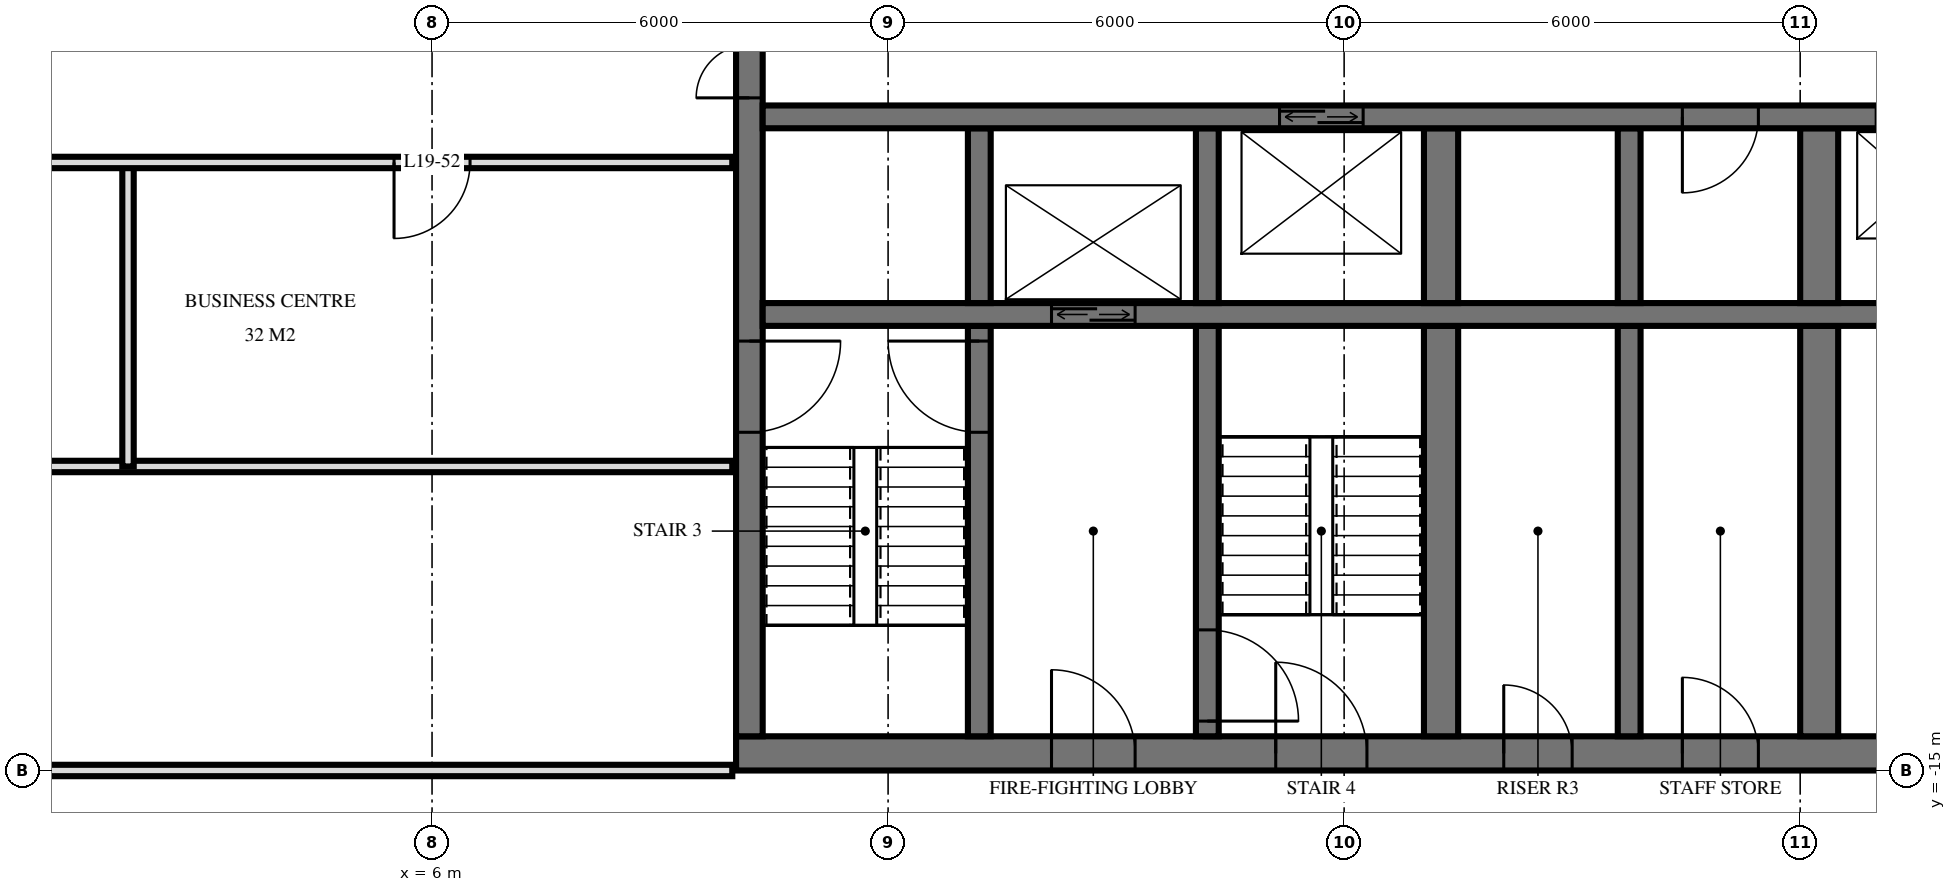
"""IFC4 building model, lengths in metres.
Left out: names, types, materials, properties, quantities, classifications, styles, units other than length and angle.
Written with IfcOpenShell. Run it as: python <this file> out.ifc"""

import sys

from ifc_helpers import new_model, si_unit, direction, frame, frame_2d, origin, place, context, subcontext, project, spatial, rectangle, extrude, element, fill, save


model = new_model("IFC4")
c1 = context("Model", 3, precision=1e-05, world=origin(), true_north=direction((0.0, 1.0)))
c2 = subcontext(c1, "Body", "Model", "MODEL_VIEW")
j1 = project(units=[si_unit("LENGTHUNIT", "METRE"), si_unit("PLANEANGLEUNIT", "RADIAN")], contexts=[c1])
p1 = place(None, origin())
s1 = spatial("IfcSite", under=j1, at=p1, CompositionType="ELEMENT")
p2 = place(p1, origin())
s2 = spatial("IfcBuilding", under=s1, at=p2, CompositionType="ELEMENT")
p3 = place(p2, frame((0.0, 0.0, 78.0)))
s3 = spatial("IfcBuildingStorey", under=s2, at=p3, CompositionType="ELEMENT", Elevation=78.0)
p4 = place(p3, frame((10.0, -14.775, 0.0), z_axis=(0.0, 0.0, 1.0), x_axis=(1.0, 0.0, 0.0)))
e1 = element("IfcWall", 1, at=p4, inside=s3, PredefinedType="SHEAR", context=c2, shape_type="SweptSolid", body=[
    extrude(rectangle(XDim=19.5, YDim=0.45, at=frame_2d((9.75, 0.0))), origin(), (0.0, 0.0, 1.0), 3.6),
])
p5 = place(p4, frame((7.1, 0.0, 0.0)))
e2 = element("IfcOpeningElement", 2, at=p5, cuts=e1, PredefinedType="OPENING", context=c2, shape_type="SweptSolid", body=[
    extrude(rectangle(XDim=1.2, YDim=2.1, at=frame_2d((0.6, 1.05))), frame((0.0, 0.235, 0.0), z_axis=(0.0, -1.0, 0.0), x_axis=(1.0, 0.0, 0.0)), (0.0, 0.0, 1.0), 0.47),
])
p6 = place(p4, frame((4.15, 0.0, 0.0)))
e3 = element("IfcOpeningElement", 3, at=p6, cuts=e1, PredefinedType="OPENING", context=c2, shape_type="SweptSolid", body=[
    extrude(rectangle(XDim=1.1, YDim=2.1, at=frame_2d((0.55, 1.05))), frame((0.0, 0.235, 0.0), z_axis=(0.0, -1.0, 0.0), x_axis=(1.0, 0.0, 0.0)), (0.0, 0.0, 1.0), 0.47),
])
p7 = place(p4, frame((10.1, 0.0, 0.0)))
e4 = element("IfcOpeningElement", 4, at=p7, cuts=e1, PredefinedType="OPENING", context=c2, shape_type="SweptSolid", body=[
    extrude(rectangle(XDim=0.9, YDim=2.1, at=frame_2d((0.45, 1.05))), frame((0.0, 0.235, 0.0), z_axis=(0.0, -1.0, 0.0), x_axis=(1.0, 0.0, 0.0)), (0.0, 0.0, 1.0), 0.47),
])
p8 = place(p4, frame((12.45, 0.0, 0.0)))
e5 = element("IfcOpeningElement", 5, at=p8, cuts=e1, PredefinedType="OPENING", context=c2, shape_type="SweptSolid", body=[
    extrude(rectangle(XDim=1.0, YDim=2.1, at=frame_2d((0.5, 1.05))), frame((0.0, 0.235, 0.0), z_axis=(0.0, -1.0, 0.0), x_axis=(1.0, 0.0, 0.0)), (0.0, 0.0, 1.0), 0.47),
])
p9 = place(p4, frame((15.512, 0.0, 0.0)))
e6 = element("IfcOpeningElement", 6, at=p9, cuts=e1, PredefinedType="OPENING", context=c2, shape_type="SweptSolid", body=[
    extrude(rectangle(XDim=1.0, YDim=2.1, at=frame_2d((0.5, 1.05))), frame((0.0, 0.235, 0.0), z_axis=(0.0, -1.0, 0.0), x_axis=(1.0, 0.0, 0.0)), (0.0, 0.0, 1.0), 0.47),
])
p10 = place(p4, frame((17.837, 0.0, 0.0)))
e7 = element("IfcOpeningElement", 7, at=p10, cuts=e1, PredefinedType="OPENING", context=c2, shape_type="SweptSolid", body=[
    extrude(rectangle(XDim=1.0, YDim=2.1, at=frame_2d((0.5, 1.05))), frame((0.0, 0.235, 0.0), z_axis=(0.0, -1.0, 0.0), x_axis=(1.0, 0.0, 0.0)), (0.0, 0.0, 1.0), 0.47),
])
p11 = place(p3, frame((10.175, -14.55, 0.0), z_axis=(0.0, 0.0, 1.0), x_axis=(0.0, 1.0, 0.0)))
e8 = element("IfcWall", 8, at=p11, inside=s3, PredefinedType="SHEAR", context=c2, shape_type="SweptSolid", body=[
    extrude(rectangle(XDim=14.1, YDim=0.35, at=frame_2d((7.05, 0.0))), origin(), (0.0, 0.0, 1.0), 3.6),
])
p12 = place(p11, frame((8.4, 0.0, 0.0)))
e9 = element("IfcOpeningElement", 9, at=p12, cuts=e8, PredefinedType="OPENING", context=c2, shape_type="SweptSolid", body=[
    extrude(rectangle(XDim=1.4, YDim=2.4, at=frame_2d((0.7, 1.2))), frame((0.0, 0.185, 0.0), z_axis=(0.0, -1.0, 0.0), x_axis=(1.0, 0.0, 0.0)), (0.0, 0.0, 1.0), 0.37),
])
p13 = place(p11, frame((10.0, 0.0, 0.0)))
e10 = element("IfcOpeningElement", 10, at=p13, cuts=e8, PredefinedType="OPENING", context=c2, shape_type="SweptSolid", body=[
    extrude(rectangle(XDim=1.4, YDim=2.4, at=frame_2d((0.7, 1.2))), frame((0.0, 0.185, 0.0), z_axis=(0.0, -1.0, 0.0), x_axis=(1.0, 0.0, 0.0)), (0.0, 0.0, 1.0), 0.37),
])
p14 = place(p11, frame((4.0, 0.0, 0.0)))
e11 = element("IfcOpeningElement", 11, at=p14, cuts=e8, PredefinedType="OPENING", context=c2, shape_type="SweptSolid", body=[
    extrude(rectangle(XDim=1.2, YDim=2.1, at=frame_2d((0.6, 1.05))), frame((0.0, 0.185, 0.0), z_axis=(0.0, -1.0, 0.0), x_axis=(1.0, 0.0, 0.0)), (0.0, 0.0, 1.0), 0.37),
])
p15 = place(p3, frame((10.35, -6.4, 0.0), z_axis=(0.0, 0.0, 1.0), x_axis=(1.0, 0.0, 0.0)))
e12 = element("IfcWall", 12, at=p15, inside=s3, PredefinedType="SHEAR", context=c2, shape_type="SweptSolid", body=[
    extrude(rectangle(XDim=18.7, YDim=0.3, at=frame_2d((9.35, 0.0))), origin(), (0.0, 0.0, 1.0), 3.6),
])
p16 = place(p15, frame((14.65, 0.0, 0.0)))
e13 = element("IfcOpeningElement", 13, at=p16, cuts=e12, PredefinedType="OPENING", context=c2, shape_type="SweptSolid", body=[
    extrude(rectangle(XDim=1.1, YDim=2.1, at=frame_2d((0.55, 1.05))), frame((0.0, 0.16, 0.0), z_axis=(0.0, -1.0, 0.0), x_axis=(1.0, 0.0, 0.0)), (0.0, 0.0, 1.0), 0.32),
])
p17 = place(p15, frame((17.05, 0.0, 0.0)))
e14 = element("IfcOpeningElement", 14, at=p17, cuts=e12, PredefinedType="OPENING", context=c2, shape_type="SweptSolid", body=[
    extrude(rectangle(XDim=1.1, YDim=2.1, at=frame_2d((0.55, 1.05))), frame((0.0, 0.16, 0.0), z_axis=(0.0, -1.0, 0.0), x_axis=(1.0, 0.0, 0.0)), (0.0, 0.0, 1.0), 0.32),
])
p18 = place(p15, frame((6.8, 0.0, 0.0)))
e15 = element("IfcOpeningElement", 15, at=p18, cuts=e12, PredefinedType="OPENING", context=c2, shape_type="SweptSolid", body=[
    extrude(rectangle(XDim=1.1, YDim=2.1, at=frame_2d((0.55, 1.05))), frame((0.0, 0.16, 0.0), z_axis=(0.0, -1.0, 0.0), x_axis=(1.0, 0.0, 0.0)), (0.0, 0.0, 1.0), 0.32),
])
p19 = place(p15, frame((12.1, 0.0, 0.0)))
e16 = element("IfcOpeningElement", 16, at=p19, cuts=e12, PredefinedType="OPENING", context=c2, shape_type="SweptSolid", body=[
    extrude(rectangle(XDim=1.0, YDim=2.1, at=frame_2d((0.5, 1.05))), frame((0.0, 0.16, 0.0), z_axis=(0.0, -1.0, 0.0), x_axis=(1.0, 0.0, 0.0)), (0.0, 0.0, 1.0), 0.32),
])
p20 = place(p3, frame((10.35, -9.0, 0.0), z_axis=(0.0, 0.0, 1.0), x_axis=(1.0, 0.0, 0.0)))
e17 = element("IfcWall", 17, at=p20, inside=s3, PredefinedType="SHEAR", context=c2, shape_type="SweptSolid", body=[
    extrude(rectangle(XDim=18.7, YDim=0.3, at=frame_2d((9.35, 0.0))), origin(), (0.0, 0.0, 1.0), 3.6),
])
p21 = place(p20, frame((3.8, 0.0, 0.0)))
e18 = element("IfcOpeningElement", 18, at=p21, cuts=e17, PredefinedType="OPENING", context=c2, shape_type="SweptSolid", body=[
    extrude(rectangle(XDim=1.1, YDim=2.1, at=frame_2d((0.55, 1.05))), frame((0.0, 0.16, 0.0), z_axis=(0.0, -1.0, 0.0), x_axis=(1.0, 0.0, 0.0)), (0.0, 0.0, 1.0), 0.32),
])
p22 = place(p3, frame((13.2, -8.85, 0.0), z_axis=(0.0, 0.0, 1.0), x_axis=(0.0, 1.0, 0.0)))
e19 = element("IfcWall", 19, at=p22, inside=s3, PredefinedType="SHEAR", context=c2, shape_type="SweptSolid", body=[
    extrude(rectangle(XDim=2.3, YDim=0.3, at=frame_2d((1.15, 0.0))), origin(), (0.0, 0.0, 1.0), 3.6),
])
p23 = place(p3, frame((13.2, -14.55, 0.0), z_axis=(0.0, 0.0, 1.0), x_axis=(0.0, 1.0, 0.0)))
e20 = element("IfcWall", 20, at=p23, inside=s3, PredefinedType="SHEAR", context=c2, shape_type="SweptSolid", body=[
    extrude(rectangle(XDim=5.4, YDim=0.3, at=frame_2d((2.7, 0.0))), origin(), (0.0, 0.0, 1.0), 3.6),
])
p24 = place(p23, frame((4.0, 0.0, 0.0)))
e21 = element("IfcOpeningElement", 21, at=p24, cuts=e20, PredefinedType="OPENING", context=c2, shape_type="SweptSolid", body=[
    extrude(rectangle(XDim=1.2, YDim=2.1, at=frame_2d((0.6, 1.05))), frame((0.0, 0.16, 0.0), z_axis=(0.0, -1.0, 0.0), x_axis=(1.0, 0.0, 0.0)), (0.0, 0.0, 1.0), 0.32),
])
p25 = place(p3, frame((16.2, -8.85, 0.0), z_axis=(0.0, 0.0, 1.0), x_axis=(0.0, 1.0, 0.0)))
e22 = element("IfcWall", 22, at=p25, inside=s3, PredefinedType="SHEAR", context=c2, shape_type="SweptSolid", body=[
    extrude(rectangle(XDim=2.3, YDim=0.3, at=frame_2d((1.15, 0.0))), origin(), (0.0, 0.0, 1.0), 3.6),
])
p26 = place(p3, frame((16.2, -14.55, 0.0), z_axis=(0.0, 0.0, 1.0), x_axis=(0.0, 1.0, 0.0)))
e23 = element("IfcWall", 23, at=p26, inside=s3, PredefinedType="SHEAR", context=c2, shape_type="SweptSolid", body=[
    extrude(rectangle(XDim=5.4, YDim=0.3, at=frame_2d((2.7, 0.0))), origin(), (0.0, 0.0, 1.0), 3.6),
])
p27 = place(p26, frame((0.2, 0.0, 0.0)))
e24 = element("IfcOpeningElement", 24, at=p27, cuts=e23, PredefinedType="OPENING", context=c2, shape_type="SweptSolid", body=[
    extrude(rectangle(XDim=1.2, YDim=2.1, at=frame_2d((0.6, 1.05))), frame((0.0, 0.16, 0.0), z_axis=(0.0, -1.0, 0.0), x_axis=(1.0, 0.0, 0.0)), (0.0, 0.0, 1.0), 0.32),
])
p28 = place(p3, frame((19.275, -8.85, 0.0), z_axis=(0.0, 0.0, 1.0), x_axis=(0.0, 1.0, 0.0)))
e25 = element("IfcWall", 25, at=p28, inside=s3, PredefinedType="SHEAR", context=c2, shape_type="SweptSolid", body=[
    extrude(rectangle(XDim=2.3, YDim=0.45, at=frame_2d((1.15, 0.0))), origin(), (0.0, 0.0, 1.0), 3.6),
])
p29 = place(p3, frame((19.275, -14.55, 0.0), z_axis=(0.0, 0.0, 1.0), x_axis=(0.0, 1.0, 0.0)))
e26 = element("IfcWall", 26, at=p29, inside=s3, PredefinedType="SHEAR", context=c2, shape_type="SweptSolid", body=[
    extrude(rectangle(XDim=5.4, YDim=0.45, at=frame_2d((2.7, 0.0))), origin(), (0.0, 0.0, 1.0), 3.6),
])
p30 = place(p3, frame((21.75, -8.85, 0.0), z_axis=(0.0, 0.0, 1.0), x_axis=(0.0, 1.0, 0.0)))
e27 = element("IfcWall", 27, at=p30, inside=s3, PredefinedType="SHEAR", context=c2, shape_type="SweptSolid", body=[
    extrude(rectangle(XDim=2.3, YDim=0.3, at=frame_2d((1.15, 0.0))), origin(), (0.0, 0.0, 1.0), 3.6),
])
p31 = place(p3, frame((21.75, -14.55, 0.0), z_axis=(0.0, 0.0, 1.0), x_axis=(0.0, 1.0, 0.0)))
e28 = element("IfcWall", 28, at=p31, inside=s3, PredefinedType="SHEAR", context=c2, shape_type="SweptSolid", body=[
    extrude(rectangle(XDim=5.4, YDim=0.3, at=frame_2d((2.7, 0.0))), origin(), (0.0, 0.0, 1.0), 3.6),
])
p32 = place(p3, frame((24.25, -8.85, 0.0), z_axis=(0.0, 0.0, 1.0), x_axis=(0.0, 1.0, 0.0)))
e29 = element("IfcWall", 29, at=p32, inside=s3, PredefinedType="SHEAR", context=c2, shape_type="SweptSolid", body=[
    extrude(rectangle(XDim=2.3, YDim=0.5, at=frame_2d((1.15, 0.0))), origin(), (0.0, 0.0, 1.0), 3.6),
])
p33 = place(p3, frame((24.25, -14.55, 0.0), z_axis=(0.0, 0.0, 1.0), x_axis=(0.0, 1.0, 0.0)))
e30 = element("IfcWall", 30, at=p33, inside=s3, PredefinedType="SHEAR", context=c2, shape_type="SweptSolid", body=[
    extrude(rectangle(XDim=5.4, YDim=0.5, at=frame_2d((2.7, 0.0))), origin(), (0.0, 0.0, 1.0), 3.6),
])
p34 = place(p3, frame((2.0, -11.0, 0.0), z_axis=(0.0, 0.0, 1.0), x_axis=(0.0, 1.0, 0.0)))
e31 = element("IfcWall", 31, at=p34, inside=s3, PredefinedType="PARTITIONING", context=c2, shape_type="SweptSolid", body=[
    extrude(rectangle(XDim=4.0, YDim=0.15, at=frame_2d((2.0, 0.0))), origin(), (0.0, 0.0, 1.0), 3.32),
])
p35 = place(p3, frame((-9.95, -15.0, 0.0), z_axis=(0.0, 0.0, 1.0), x_axis=(1.0, 0.0, 0.0)))
e32 = element("IfcWall", 32, at=p35, inside=s3, PredefinedType="PARTITIONING", context=c2, shape_type="SweptSolid", body=[
    extrude(rectangle(XDim=19.9, YDim=0.15, at=frame_2d((9.95, 0.0))), origin(), (0.0, 0.0, 1.0), 2.684),
])
p36 = place(p35, frame((9.45, 0.0, 0.0)))
e33 = element("IfcOpeningElement", 33, at=p36, cuts=e32, PredefinedType="OPENING", context=c2, shape_type="SweptSolid", body=[
    extrude(rectangle(XDim=1.0, YDim=2.1, at=frame_2d((0.5, 1.05))), frame((0.0, 0.085, 0.0), z_axis=(0.0, -1.0, 0.0), x_axis=(1.0, 0.0, 0.0)), (0.0, 0.0, 1.0), 0.17),
])
p37 = place(p3, frame((-9.95, -11.0, 0.0), z_axis=(0.0, 0.0, 1.0), x_axis=(1.0, 0.0, 0.0)))
e34 = element("IfcWall", 34, at=p37, inside=s3, PredefinedType="PARTITIONING", context=c2, shape_type="SweptSolid", body=[
    extrude(rectangle(XDim=19.9, YDim=0.15, at=frame_2d((9.95, 0.0))), origin(), (0.0, 0.0, 1.0), 3.32),
])
p38 = place(p37, frame((9.45, 0.0, 0.0)))
e35 = element("IfcOpeningElement", 35, at=p38, cuts=e34, PredefinedType="OPENING", context=c2, shape_type="SweptSolid", body=[
    extrude(rectangle(XDim=1.0, YDim=2.1, at=frame_2d((0.5, 1.05))), frame((0.0, 0.085, 0.0), z_axis=(0.0, -1.0, 0.0), x_axis=(1.0, 0.0, 0.0)), (0.0, 0.0, 1.0), 0.17),
])
p39 = place(p37, frame((3.45, 0.0, 0.0)))
e36 = element("IfcOpeningElement", 36, at=p39, cuts=e34, PredefinedType="OPENING", context=c2, shape_type="SweptSolid", body=[
    extrude(rectangle(XDim=1.0, YDim=2.1, at=frame_2d((0.5, 1.05))), frame((0.0, 0.085, 0.0), z_axis=(0.0, -1.0, 0.0), x_axis=(1.0, 0.0, 0.0)), (0.0, 0.0, 1.0), 0.17),
])
p40 = place(p3, frame((-9.95, -7.0, 0.0), z_axis=(0.0, 0.0, 1.0), x_axis=(1.0, 0.0, 0.0)))
e37 = element("IfcWall", 37, at=p40, inside=s3, PredefinedType="PARTITIONING", context=c2, shape_type="SweptSolid", body=[
    extrude(rectangle(XDim=19.9, YDim=0.15, at=frame_2d((9.95, 0.0))), origin(), (0.0, 0.0, 1.0), 3.32),
])
p41 = place(p40, frame((9.45, 0.0, 0.0)))
e38 = element("IfcOpeningElement", 38, at=p41, cuts=e37, PredefinedType="OPENING", context=c2, shape_type="SweptSolid", body=[
    extrude(rectangle(XDim=1.0, YDim=2.1, at=frame_2d((0.5, 1.05))), frame((0.0, 0.085, 0.0), z_axis=(0.0, -1.0, 0.0), x_axis=(1.0, 0.0, 0.0)), (0.0, 0.0, 1.0), 0.17),
])
p42 = place(p40, frame((15.45, 0.0, 0.0)))
e39 = element("IfcOpeningElement", 39, at=p42, cuts=e37, PredefinedType="OPENING", context=c2, shape_type="SweptSolid", body=[
    extrude(rectangle(XDim=1.0, YDim=2.1, at=frame_2d((0.5, 1.05))), frame((0.0, 0.085, 0.0), z_axis=(0.0, -1.0, 0.0), x_axis=(1.0, 0.0, 0.0)), (0.0, 0.0, 1.0), 0.17),
])
p43 = place(p21, origin())
e40 = element("IfcDoor", 40, at=p43, inside=s3, OperationType="DOUBLE_DOOR_SLIDING", PredefinedType="USERDEFINED", context=c2, shape_type="SweptSolid", body=[
    extrude(rectangle(XDim=1.1, YDim=2.1, at=frame_2d((0.55, 1.05))), frame((0.0, 0.025, 0.0), z_axis=(0.0, -1.0, 0.0), x_axis=(1.0, 0.0, 0.0)), (0.0, 0.0, 1.0), 0.05),
])
fill(e18, e40)
p44 = place(p18, origin())
e41 = element("IfcDoor", 41, at=p44, inside=s3, OperationType="DOUBLE_DOOR_SLIDING", PredefinedType="USERDEFINED", context=c2, shape_type="SweptSolid", body=[
    extrude(rectangle(XDim=1.1, YDim=2.1, at=frame_2d((0.55, 1.05))), frame((0.0, 0.025, 0.0), z_axis=(0.0, -1.0, 0.0), x_axis=(1.0, 0.0, 0.0)), (0.0, 0.0, 1.0), 0.05),
])
fill(e15, e41)
p45 = place(p12, origin())
e42 = element("IfcDoor", 42, at=p45, inside=s3, OperationType="DOUBLE_DOOR_SINGLE_SWING", PredefinedType="DOOR", context=c2, shape_type="SweptSolid", body=[
    extrude(rectangle(XDim=1.4, YDim=2.4, at=frame_2d((0.7, 1.2))), frame((0.0, 0.025, 0.0), z_axis=(0.0, -1.0, 0.0), x_axis=(1.0, 0.0, 0.0)), (0.0, 0.0, 1.0), 0.05),
])
fill(e9, e42)
p46 = place(p14, frame((0.6, 0.0, 0.0), z_axis=(0.0, 0.0, 1.0), x_axis=(-1.0, 0.0, 0.0)))
e43 = element("IfcDoor", 43, at=p46, inside=s3, OperationType="SINGLE_SWING_RIGHT", PredefinedType="DOOR", context=c2, shape_type="SweptSolid", body=[
    extrude(rectangle(XDim=1.2, YDim=2.1, at=frame_2d((0.0, 1.05))), frame((0.0, -0.025, 0.0), z_axis=(0.0, 1.0, 0.0), x_axis=(-1.0, 0.0, 0.0)), (0.0, 0.0, 1.0), 0.05),
])
fill(e11, e43)
p47 = place(p5, origin())
e44 = element("IfcDoor", 44, at=p47, inside=s3, OperationType="SINGLE_SWING_RIGHT", PredefinedType="DOOR", context=c2, shape_type="SweptSolid", body=[
    extrude(rectangle(XDim=1.2, YDim=2.1, at=frame_2d((0.6, 1.05))), frame((0.0, 0.025, 0.0), z_axis=(0.0, -1.0, 0.0), x_axis=(1.0, 0.0, 0.0)), (0.0, 0.0, 1.0), 0.05),
])
fill(e2, e44)
p48 = place(p6, origin())
e45 = element("IfcDoor", 45, at=p48, inside=s3, OperationType="SINGLE_SWING_RIGHT", PredefinedType="DOOR", context=c2, shape_type="SweptSolid", body=[
    extrude(rectangle(XDim=1.1, YDim=2.1, at=frame_2d((0.55, 1.05))), frame((0.0, 0.025, 0.0), z_axis=(0.0, -1.0, 0.0), x_axis=(1.0, 0.0, 0.0)), (0.0, 0.0, 1.0), 0.05),
])
fill(e3, e45)
p49 = place(p7, origin())
e46 = element("IfcDoor", 46, at=p49, inside=s3, OperationType="SINGLE_SWING_RIGHT", PredefinedType="DOOR", context=c2, shape_type="SweptSolid", body=[
    extrude(rectangle(XDim=0.9, YDim=2.1, at=frame_2d((0.45, 1.05))), frame((0.0, 0.025, 0.0), z_axis=(0.0, -1.0, 0.0), x_axis=(1.0, 0.0, 0.0)), (0.0, 0.0, 1.0), 0.05),
])
fill(e4, e46)
p50 = place(p8, origin())
e47 = element("IfcDoor", 47, at=p50, inside=s3, OperationType="SINGLE_SWING_RIGHT", PredefinedType="DOOR", context=c2, shape_type="SweptSolid", body=[
    extrude(rectangle(XDim=1.0, YDim=2.1, at=frame_2d((0.5, 1.05))), frame((0.0, 0.025, 0.0), z_axis=(0.0, -1.0, 0.0), x_axis=(1.0, 0.0, 0.0)), (0.0, 0.0, 1.0), 0.05),
])
fill(e5, e47)
p51 = place(p19, frame((0.5, 0.0, 0.0), z_axis=(0.0, 0.0, 1.0), x_axis=(-1.0, 0.0, 0.0)))
e48 = element("IfcDoor", 48, at=p51, inside=s3, OperationType="SINGLE_SWING_LEFT", PredefinedType="DOOR", context=c2, shape_type="SweptSolid", body=[
    extrude(rectangle(XDim=1.0, YDim=2.1, at=frame_2d((0.0, 1.05))), frame((0.0, -0.025, 0.0), z_axis=(0.0, 1.0, 0.0), x_axis=(-1.0, 0.0, 0.0)), (0.0, 0.0, 1.0), 0.05),
])
fill(e16, e48)
p52 = place(p24, origin())
e49 = element("IfcDoor", 49, at=p52, inside=s3, OperationType="SINGLE_SWING_LEFT", PredefinedType="DOOR", context=c2, shape_type="SweptSolid", body=[
    extrude(rectangle(XDim=1.2, YDim=2.1, at=frame_2d((0.6, 1.05))), frame((0.0, 0.025, 0.0), z_axis=(0.0, -1.0, 0.0), x_axis=(1.0, 0.0, 0.0)), (0.0, 0.0, 1.0), 0.05),
])
fill(e21, e49)
p53 = place(p27, frame((0.6, 0.0, 0.0), z_axis=(0.0, 0.0, 1.0), x_axis=(-1.0, 0.0, 0.0)))
e50 = element("IfcDoor", 50, at=p53, inside=s3, OperationType="SINGLE_SWING_LEFT", PredefinedType="DOOR", context=c2, shape_type="SweptSolid", body=[
    extrude(rectangle(XDim=1.2, YDim=2.1, at=frame_2d((0.0, 1.05))), frame((0.0, -0.025, 0.0), z_axis=(0.0, 1.0, 0.0), x_axis=(-1.0, 0.0, 0.0)), (0.0, 0.0, 1.0), 0.05),
])
fill(e24, e50)
p54 = place(p42, frame((0.5, 0.0, 0.0), z_axis=(0.0, 0.0, 1.0), x_axis=(-1.0, 0.0, 0.0)))
e51 = element("IfcDoor", 51, at=p54, inside=s3, OperationType="SINGLE_SWING_LEFT", PredefinedType="DOOR", context=c2, shape_type="SweptSolid", body=[
    extrude(rectangle(XDim=1.0, YDim=2.1, at=frame_2d((0.0, 1.05))), frame((0.0, -0.025, 0.0), z_axis=(0.0, 1.0, 0.0), x_axis=(-1.0, 0.0, 0.0)), (0.0, 0.0, 1.0), 0.05),
])
fill(e39, e51)
save(model, sys.argv[1])
